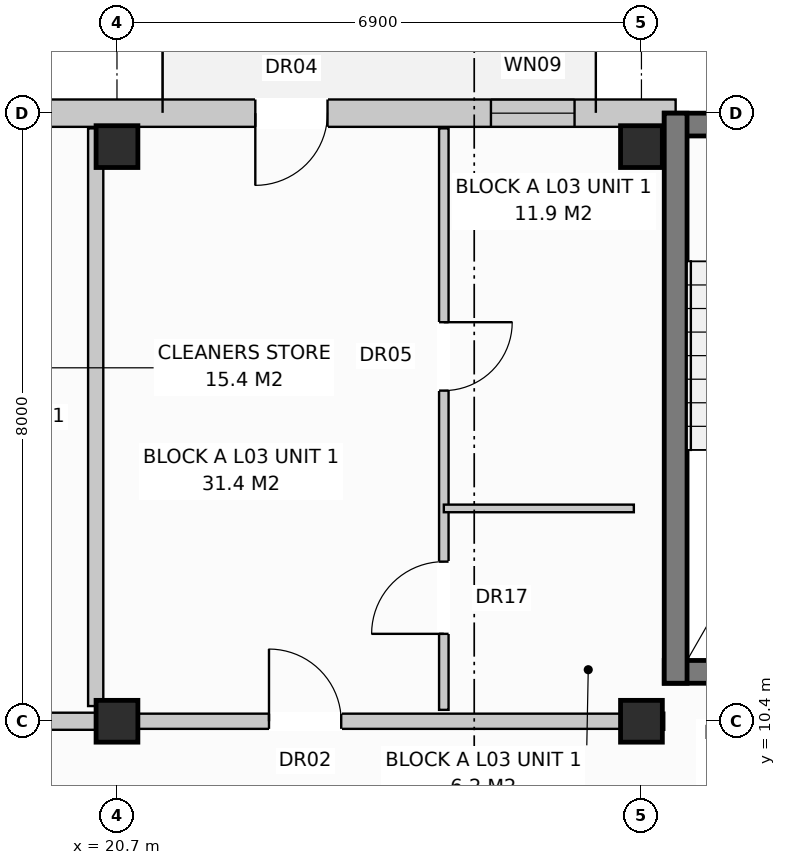
"""IFC4 building model, lengths in metres.
Left out: names, types, materials, properties, quantities, classifications, styles, units other than length and angle.
Written with IfcOpenShell. Run it as: python <this file> out.ifc"""

import sys

from ifc_helpers import new_model, si_unit, direction, frame, frame_2d, origin, origin_with_axes, origin_2d, place, context, subcontext, project, spatial, rectangle, extrude, element, fill, save


model = new_model("IFC4")
c1 = context("Model", 3, precision=1e-05, world=origin(), true_north=direction((0.0, 1.0)))
c2 = subcontext(c1, "Body", "Model", "MODEL_VIEW")
j1 = project(units=[si_unit("LENGTHUNIT", "METRE"), si_unit("PLANEANGLEUNIT", "RADIAN")], contexts=[c1])
p1 = place(None, origin())
s1 = spatial("IfcSite", under=j1, at=p1, CompositionType="ELEMENT")
p2 = place(p1, origin())
s2 = spatial("IfcBuilding", under=s1, at=p2, CompositionType="ELEMENT")
p3 = place(p2, frame((0.0, 0.0, 11.2)))
s3 = spatial("IfcBuildingStorey", under=s2, at=p3, CompositionType="ELEMENT", Elevation=11.2)
for number, where, z_axis, x_axis in (
    (1, (20.7, 10.4, 0.0), (0.0, 0.0, 1.0), (1.0, 0.0, 0.0)),
    (2, (20.7, 17.96, 0.0), (0.0, 0.0, 1.0), (1.0, 0.0, 0.0)),
    (3, (27.6, 10.4, 0.0), (0.0, 0.0, 1.0), (1.0, 0.0, 0.0)),
    (4, (27.6, 17.96, 0.0), (0.0, 0.0, 1.0), (1.0, 0.0, 0.0)),
):
    element("IfcColumn", number, at=place(p3, frame(where, z_axis=z_axis, x_axis=x_axis)), inside=s3, PredefinedType="COLUMN", context=c2, shape_type="SweptSolid", body=[
        extrude(rectangle(XDim=0.55, YDim=0.55, at=origin_2d()), origin(), (0.0, 0.0, 1.0), 3.2),
    ])
p4 = place(p3, frame((10.65, 18.4, 0.0), z_axis=(0.0, 0.0, 1.0), x_axis=(1.0, 0.0, 0.0)))
e5 = element("IfcWall", 5, at=p4, inside=s3, PredefinedType="STANDARD", context=c2, shape_type="SweptSolid", body=[
    extrude(rectangle(XDim=17.4, YDim=0.36, at=frame_2d((8.7, 0.0))), origin(), (0.0, 0.0, 1.0), 2.94),
])
p5 = place(p4, frame((11.87, 0.0, 0.0)))
e6 = element("IfcOpeningElement", 6, at=p5, cuts=e5, PredefinedType="OPENING", context=c2, shape_type="SweptSolid", body=[
    extrude(rectangle(XDim=0.95, YDim=2.1, at=frame_2d((0.475, 1.05))), frame((0.0, 0.192, 0.0), z_axis=(0.0, -1.0, 0.0), x_axis=(1.0, 0.0, 0.0)), (0.0, 0.0, 1.0), 0.384),
])
p6 = place(p4, frame((14.97, 0.0, 0.72)))
e7 = element("IfcOpeningElement", 7, at=p6, cuts=e5, PredefinedType="OPENING", context=c2, shape_type="SweptSolid", body=[
    extrude(rectangle(XDim=1.1, YDim=1.5, at=frame_2d((0.55, 0.75))), frame((0.0, 0.192, 0.0), z_axis=(0.0, -1.0, 0.0), x_axis=(1.0, 0.0, 0.0)), (0.0, 0.0, 1.0), 0.384),
])
p7 = place(p3, frame((20.42, 10.6, 0.0), z_axis=(0.0, 0.0, 1.0), x_axis=(0.0, 1.0, 0.0)))
e8 = element("IfcWall", 8, at=p7, inside=s3, PredefinedType="PARTITIONING", context=c2, shape_type="SweptSolid", body=[
    extrude(rectangle(XDim=7.6, YDim=0.2, at=frame_2d((3.8, 0.0))), origin(), (0.0, 0.0, 1.0), 2.94),
])
p8 = place(p3, frame((10.8, 10.4, 0.0), z_axis=(0.0, 0.0, 1.0), x_axis=(1.0, 0.0, 0.0)))
e9 = element("IfcWall", 9, at=p8, inside=s3, PredefinedType="PARTITIONING", context=c2, shape_type="SweptSolid", body=[
    extrude(rectangle(XDim=9.9, YDim=0.225, at=frame_2d((4.95, 0.0))), origin(), (0.0, 0.0, 1.0), 2.38),
])
p9 = place(p8, frame((0.475, 0.0, 0.0)))
e10 = element("IfcOpeningElement", 10, at=p9, cuts=e9, PredefinedType="OPENING", context=c2, shape_type="SweptSolid", body=[
    extrude(rectangle(XDim=1.1, YDim=2.15, at=frame_2d((0.55, 1.075))), frame((0.0, 0.125, 0.0), z_axis=(0.0, -1.0, 0.0), x_axis=(1.0, 0.0, 0.0)), (0.0, 0.0, 1.0), 0.249),
])
p10 = place(p8, frame((5.75, 0.0, 0.0)))
e11 = element("IfcOpeningElement", 11, at=p10, cuts=e9, PredefinedType="OPENING", context=c2, shape_type="SweptSolid", body=[
    extrude(rectangle(XDim=0.9, YDim=2.1, at=frame_2d((0.45, 1.05))), frame((0.0, 0.125, 0.0), z_axis=(0.0, -1.0, 0.0), x_axis=(1.0, 0.0, 0.0)), (0.0, 0.0, 1.0), 0.249),
])
p11 = place(p8, frame((7.8, 0.0, 0.0)))
e12 = element("IfcOpeningElement", 12, at=p11, cuts=e9, PredefinedType="OPENING", context=c2, shape_type="SweptSolid", body=[
    extrude(rectangle(XDim=0.95, YDim=2.15, at=frame_2d((0.475, 1.075))), frame((0.0, 0.125, 0.0), z_axis=(0.0, -1.0, 0.0), x_axis=(1.0, 0.0, 0.0)), (0.0, 0.0, 1.0), 0.249),
])
for number, where, z_axis, x_axis in (
    (13, (27.9, 18.25, 0.0), (0.0, 0.0, 1.0), (1.0, 0.0, 0.0)),
    (14, (27.9, 11.05, 0.0), (0.0, 0.0, 1.0), (1.0, 0.0, 0.0)),
):
    element("IfcWall", number, at=place(p3, frame(where, z_axis=z_axis, x_axis=x_axis)), inside=s3, PredefinedType="SHEAR", context=c2, shape_type="SweptSolid", body=[
        extrude(rectangle(XDim=3.6, YDim=0.3, at=frame_2d((1.8, 0.0))), origin(), (0.0, 0.0, 1.0), 2.94),
    ])
p12 = place(p3, frame((28.05, 10.9, 0.0), z_axis=(0.0, 0.0, 1.0), x_axis=(0.0, 1.0, 0.0)))
e15 = element("IfcWall", 15, at=p12, inside=s3, PredefinedType="SHEAR", context=c2, shape_type="SweptSolid", body=[
    extrude(rectangle(XDim=7.5, YDim=0.3, at=frame_2d((3.75, 0.0))), origin(), (0.0, 0.0, 1.0), 2.94),
])
p13 = place(p3, frame((27.6, 10.4, 0.0), z_axis=(0.0, 0.0, 1.0), x_axis=(1.0, 0.0, 0.0)))
e16 = element("IfcWall", 16, at=p13, inside=s3, PredefinedType="PARTITIONING", context=c2, shape_type="SweptSolid", body=[
    extrude(rectangle(XDim=0.3, YDim=0.225, at=frame_2d((0.15, 0.0))), origin(), (0.0, 0.0, 1.0), 2.94),
])
p14 = place(p3, frame((20.7, 10.4, 0.0), z_axis=(0.0, 0.0, 1.0), x_axis=(1.0, 0.0, 0.0)))
e17 = element("IfcWall", 17, at=p14, inside=s3, PredefinedType="PARTITIONING", context=c2, shape_type="SweptSolid", body=[
    extrude(rectangle(XDim=6.9, YDim=0.2, at=frame_2d((3.45, 0.0))), origin(), (0.0, 0.0, 1.0), 2.38),
])
p15 = place(p14, frame((2.0, 0.0, 0.0)))
e18 = element("IfcOpeningElement", 18, at=p15, cuts=e17, PredefinedType="OPENING", context=c2, shape_type="SweptSolid", body=[
    extrude(rectangle(XDim=0.95, YDim=2.15, at=frame_2d((0.475, 1.075))), frame((0.0, 0.112, 0.0), z_axis=(0.0, -1.0, 0.0), x_axis=(1.0, 0.0, 0.0)), (0.0, 0.0, 1.0), 0.224),
])
p16 = place(p3, frame((25.0, 10.55, 0.0), z_axis=(0.0, 0.0, 1.0), x_axis=(0.0, 1.0, 0.0)))
e19 = element("IfcWall", 19, at=p16, inside=s3, PredefinedType="PARTITIONING", context=c2, shape_type="SweptSolid", body=[
    extrude(rectangle(XDim=7.65, YDim=0.125, at=frame_2d((3.825, 0.0))), origin(), (0.0, 0.0, 1.0), 2.94),
])
p17 = place(p16, frame((1.0, 0.0, 0.0)))
e20 = element("IfcOpeningElement", 20, at=p17, cuts=e19, PredefinedType="OPENING", context=c2, shape_type="SweptSolid", body=[
    extrude(rectangle(XDim=0.95, YDim=2.1, at=frame_2d((0.475, 1.05))), frame((0.0, 0.074, 0.0), z_axis=(0.0, -1.0, 0.0), x_axis=(1.0, 0.0, 0.0)), (0.0, 0.0, 1.0), 0.149),
])
p18 = place(p16, frame((4.2, 0.0, 0.0)))
e21 = element("IfcOpeningElement", 21, at=p18, cuts=e19, PredefinedType="OPENING", context=c2, shape_type="SweptSolid", body=[
    extrude(rectangle(XDim=0.9, YDim=2.1, at=frame_2d((0.45, 1.05))), frame((0.0, 0.074, 0.0), z_axis=(0.0, -1.0, 0.0), x_axis=(1.0, 0.0, 0.0)), (0.0, 0.0, 1.0), 0.149),
])
p19 = place(p3, frame((25.0, 13.2, 0.0), z_axis=(0.0, 0.0, 1.0), x_axis=(1.0, 0.0, 0.0)))
e22 = element("IfcWall", 22, at=p19, inside=s3, PredefinedType="PARTITIONING", context=c2, shape_type="SweptSolid", body=[
    extrude(rectangle(XDim=2.5, YDim=0.1, at=frame_2d((1.25, 0.0))), origin(), (0.0, 0.0, 1.0), 2.94),
])
p20 = place(p5, frame((0.95, 0.0, 0.0), z_axis=(0.0, 0.0, 1.0), x_axis=(-1.0, 0.0, 0.0)))
e23 = element("IfcDoor", 23, at=p20, inside=s3, OperationType="SINGLE_SWING_LEFT", PredefinedType="DOOR", context=c2, shape_type="SweptSolid", body=[
    extrude(rectangle(XDim=0.95, YDim=2.1, at=frame_2d((0.475, 1.05))), frame((0.0, 0.025, 0.0), z_axis=(0.0, -1.0, 0.0), x_axis=(1.0, 0.0, 0.0)), (0.0, 0.0, 1.0), 0.05),
])
fill(e6, e23)
p21 = place(p6, origin_with_axes())
e24 = element("IfcWindow", 24, at=p21, inside=s3, PartitioningType="SINGLE_PANEL", PredefinedType="WINDOW", context=c2, shape_type="SweptSolid", body=[
    extrude(rectangle(XDim=1.1, YDim=1.5, at=frame_2d((0.55, 0.75))), frame((0.0, 0.03, 0.0), z_axis=(0.0, -1.0, 0.0), x_axis=(1.0, 0.0, 0.0)), (0.0, 0.0, 1.0), 0.06),
])
fill(e7, e24)
p22 = place(p15, origin_with_axes())
e25 = element("IfcDoor", 25, at=p22, inside=s3, OperationType="SINGLE_SWING_LEFT", PredefinedType="DOOR", context=c2, shape_type="SweptSolid", body=[
    extrude(rectangle(XDim=0.95, YDim=2.15, at=frame_2d((0.475, 1.075))), frame((0.0, 0.025, 0.0), z_axis=(0.0, -1.0, 0.0), x_axis=(1.0, 0.0, 0.0)), (0.0, 0.0, 1.0), 0.05),
])
fill(e18, e25)
p23 = place(p17, origin_with_axes())
e26 = element("IfcDoor", 26, at=p23, inside=s3, OperationType="SINGLE_SWING_LEFT", PredefinedType="DOOR", context=c2, shape_type="SweptSolid", body=[
    extrude(rectangle(XDim=0.95, YDim=2.1, at=frame_2d((0.475, 1.05))), frame((0.0, 0.025, 0.0), z_axis=(0.0, -1.0, 0.0), x_axis=(1.0, 0.0, 0.0)), (0.0, 0.0, 1.0), 0.05),
])
fill(e20, e26)
p24 = place(p18, frame((0.9, 0.0, 0.0), z_axis=(0.0, 0.0, 1.0), x_axis=(-1.0, 0.0, 0.0)))
e27 = element("IfcDoor", 27, at=p24, inside=s3, OperationType="SINGLE_SWING_RIGHT", PredefinedType="DOOR", context=c2, shape_type="SweptSolid", body=[
    extrude(rectangle(XDim=0.9, YDim=2.1, at=frame_2d((0.45, 1.05))), frame((0.0, 0.025, 0.0), z_axis=(0.0, -1.0, 0.0), x_axis=(1.0, 0.0, 0.0)), (0.0, 0.0, 1.0), 0.05),
])
fill(e21, e27)
save(model, sys.argv[1])
